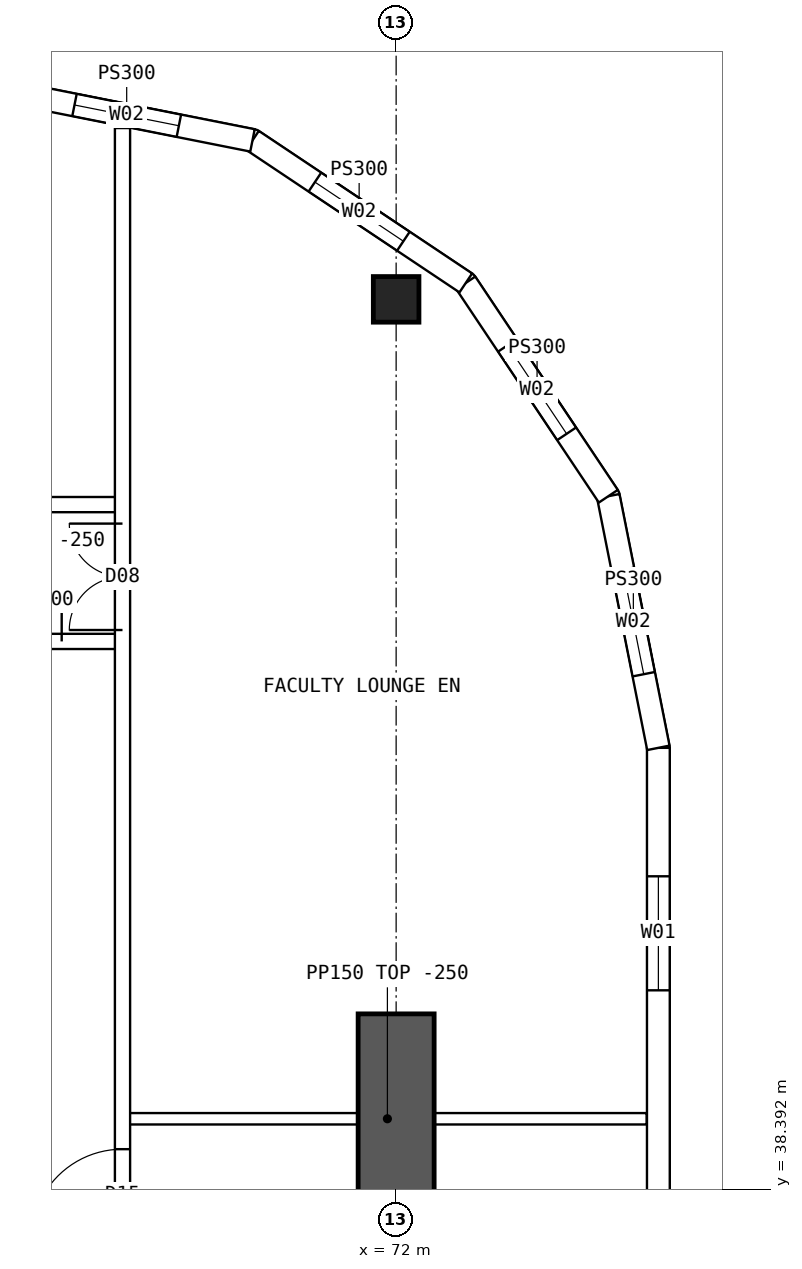
"""IFC4 building model, lengths in metres.
Left out: names, types, materials, properties, quantities, classifications, styles, units other than length and angle.
Written with IfcOpenShell. Run it as: python <this file> out.ifc"""

import sys

from ifc_helpers import new_model, si_unit, direction, frame, frame_2d, origin, origin_2d, place, context, subcontext, project, spatial, polyline, rectangle, hollow_rectangle, outline, extrude, element, fill, save


model = new_model("IFC4")
c1 = context("Model", 3, precision=1e-05, world=origin(), true_north=direction((0.0, 1.0)))
c2 = subcontext(c1, "Body", "Model", "MODEL_VIEW")
j1 = project(units=[si_unit("LENGTHUNIT", "METRE"), si_unit("PLANEANGLEUNIT", "RADIAN")], contexts=[c1])
p1 = place(None, origin())
s1 = spatial("IfcSite", under=j1, at=p1, CompositionType="ELEMENT")
p2 = place(p1, origin())
s2 = spatial("IfcBuilding", under=s1, at=p2, CompositionType="ELEMENT")
p3 = place(p2, frame((0.0, 0.0, 216.55)))
s3 = spatial("IfcBuildingStorey", under=s2, at=p3, CompositionType="ELEMENT", Elevation=216.55)
p4 = place(p3, frame((72.0, 50.1, 0.0), z_axis=(0.0, 0.0, 1.0), x_axis=(1.0, 0.0, 0.0)))
e1 = element("IfcColumn", 1, at=p4, inside=s3, PredefinedType="COLUMN", context=c2, shape_type="SweptSolid", body=[
    extrude(hollow_rectangle(XDim=0.6, YDim=0.6, WallThickness=0.06, at=origin_2d()), origin(), (0.0, 0.0, 1.0), 3.75),
])
p5 = place(p3, frame((72.0, 35.7, 0.0), z_axis=(0.0, 0.0, 1.0), x_axis=(0.0, 1.0, 0.0)))
e2 = element("IfcWall", 2, at=p5, inside=s3, PredefinedType="SHEAR", context=c2, shape_type="SweptSolid", body=[
    extrude(rectangle(XDim=5.0, YDim=1.0, at=frame_2d((2.5, 0.0))), origin(), (0.0, 0.0, 1.0), 3.75),
])
p6 = place(p3, frame((75.45, 19.8, 0.0), z_axis=(0.0, 0.0, 1.0), x_axis=(0.0, 1.0, 0.0)))
e3 = element("IfcWall", 3, at=p6, inside=s3, PredefinedType="SOLIDWALL", context=c2, shape_type="SweptSolid", body=[
    extrude(outline(polyline([(-0.015, -0.15), (24.415, -0.15), (24.385, 0.15), (0.015, 0.15), (-0.015, -0.15)])), origin(), (0.0, 0.0, 1.0), 3.5),
])
p7 = place(p6, frame((1.69, 0.0, 0.9)))
e4 = element("IfcOpeningElement", 4, at=p7, cuts=e3, PredefinedType="OPENING", context=c2, shape_type="SweptSolid", body=[
    extrude(rectangle(XDim=1.5, YDim=2.0, at=frame_2d((0.75, 1.0))), frame((0.0, 0.16, 0.0), z_axis=(0.0, -1.0, 0.0), x_axis=(1.0, 0.0, 0.0)), (0.0, 0.0, 1.0), 0.32),
])
p8 = place(p6, frame((6.57, 0.0, 0.9)))
e5 = element("IfcOpeningElement", 5, at=p8, cuts=e3, PredefinedType="OPENING", context=c2, shape_type="SweptSolid", body=[
    extrude(rectangle(XDim=1.5, YDim=2.0, at=frame_2d((0.75, 1.0))), frame((0.0, 0.16, 0.0), z_axis=(0.0, -1.0, 0.0), x_axis=(1.0, 0.0, 0.0)), (0.0, 0.0, 1.0), 0.32),
])
p9 = place(p6, frame((11.45, 0.0, 0.9)))
e6 = element("IfcOpeningElement", 6, at=p9, cuts=e3, PredefinedType="OPENING", context=c2, shape_type="SweptSolid", body=[
    extrude(rectangle(XDim=1.5, YDim=2.0, at=frame_2d((0.75, 1.0))), frame((0.0, 0.16, 0.0), z_axis=(0.0, -1.0, 0.0), x_axis=(1.0, 0.0, 0.0)), (0.0, 0.0, 1.0), 0.32),
])
p10 = place(p6, frame((16.33, 0.0, 0.9)))
e7 = element("IfcOpeningElement", 7, at=p10, cuts=e3, PredefinedType="OPENING", context=c2, shape_type="SweptSolid", body=[
    extrude(rectangle(XDim=1.5, YDim=2.0, at=frame_2d((0.75, 1.0))), frame((0.0, 0.16, 0.0), z_axis=(0.0, -1.0, 0.0), x_axis=(1.0, 0.0, 0.0)), (0.0, 0.0, 1.0), 0.32),
])
p11 = place(p6, frame((21.21, 0.0, 0.9)))
e8 = element("IfcOpeningElement", 8, at=p11, cuts=e3, PredefinedType="OPENING", context=c2, shape_type="SweptSolid", body=[
    extrude(rectangle(XDim=1.5, YDim=2.0, at=frame_2d((0.75, 1.0))), frame((0.0, 0.16, 0.0), z_axis=(0.0, -1.0, 0.0), x_axis=(1.0, 0.0, 0.0)), (0.0, 0.0, 1.0), 0.32),
])
p12 = place(p3, frame((75.45, 44.2, 0.0), z_axis=(0.0, 0.0, 1.0), x_axis=(-0.19508664885, 0.980786011034, 0.0)))
e9 = element("IfcWall", 9, at=p12, inside=s3, PredefinedType="SOLIDWALL", context=c2, shape_type="SweptSolid", body=[
    extrude(outline(polyline([(-0.015, -0.15), (3.405, -0.15), (3.345, 0.15), (0.015, 0.15), (-0.015, -0.15)])), origin(), (0.0, 0.0, 1.0), 3.5),
])
p13 = place(p12, frame((0.988, 0.0, 0.9)))
e10 = element("IfcOpeningElement", 10, at=p13, cuts=e9, PredefinedType="OPENING", context=c2, shape_type="SweptSolid", body=[
    extrude(rectangle(XDim=1.4, YDim=1.8, at=frame_2d((0.7, 0.9))), frame((0.0, 0.16, 0.0), z_axis=(0.0, -1.0, 0.0), x_axis=(1.0, 0.0, 0.0)), (0.0, 0.0, 1.0), 0.32),
])
p14 = place(p3, frame((74.792, 47.51, 0.0), z_axis=(0.0, 0.0, 1.0), x_axis=(-0.555567969291, 0.831471124873, 0.0)))
e11 = element("IfcWall", 11, at=p14, inside=s3, PredefinedType="SOLIDWALL", context=c2, shape_type="SweptSolid", body=[
    extrude(outline(polyline([(-0.03, -0.15), (3.405, -0.15), (3.345, 0.15), (0.03, 0.15), (-0.03, -0.15)])), origin(), (0.0, 0.0, 1.0), 3.5),
])
p15 = place(p14, frame((0.988, 0.0, 0.9)))
e12 = element("IfcOpeningElement", 12, at=p15, cuts=e11, PredefinedType="OPENING", context=c2, shape_type="SweptSolid", body=[
    extrude(rectangle(XDim=1.4, YDim=1.8, at=frame_2d((0.7, 0.9))), frame((0.0, 0.16, 0.0), z_axis=(0.0, -1.0, 0.0), x_axis=(1.0, 0.0, 0.0)), (0.0, 0.0, 1.0), 0.32),
])
p16 = place(p3, frame((72.917, 50.316, 0.0), z_axis=(0.0, 0.0, 1.0), x_axis=(-0.831460037396, 0.555584562613, 0.0)))
e13 = element("IfcWall", 13, at=p16, inside=s3, PredefinedType="SOLIDWALL", context=c2, shape_type="SweptSolid", body=[
    extrude(outline(polyline([(-0.03, -0.15), (3.405, -0.15), (3.345, 0.15), (0.03, 0.15), (-0.03, -0.15)])), origin(), (0.0, 0.0, 1.0), 3.5),
])
p17 = place(p16, frame((0.988, 0.0, 0.9)))
e14 = element("IfcOpeningElement", 14, at=p17, cuts=e13, PredefinedType="OPENING", context=c2, shape_type="SweptSolid", body=[
    extrude(rectangle(XDim=1.4, YDim=1.8, at=frame_2d((0.7, 0.9))), frame((0.0, 0.16, 0.0), z_axis=(0.0, -1.0, 0.0), x_axis=(1.0, 0.0, 0.0)), (0.0, 0.0, 1.0), 0.32),
])
p18 = place(p3, frame((70.11, 52.192, 0.0), z_axis=(0.0, 0.0, 1.0), x_axis=(-0.98078325777, 0.195100490205, 0.0)))
e15 = element("IfcWall", 15, at=p18, inside=s3, PredefinedType="SOLIDWALL", context=c2, shape_type="SweptSolid", body=[
    extrude(outline(polyline([(-0.03, -0.15), (3.405, -0.15), (3.345, 0.15), (0.03, 0.15), (-0.03, -0.15)])), origin(), (0.0, 0.0, 1.0), 3.5),
])
p19 = place(p18, frame((0.988, 0.0, 0.9)))
e16 = element("IfcOpeningElement", 16, at=p19, cuts=e15, PredefinedType="OPENING", context=c2, shape_type="SweptSolid", body=[
    extrude(rectangle(XDim=1.4, YDim=1.8, at=frame_2d((0.7, 0.9))), frame((0.0, 0.16, 0.0), z_axis=(0.0, -1.0, 0.0), x_axis=(1.0, 0.0, 0.0)), (0.0, 0.0, 1.0), 0.32),
])
p20 = place(p3, frame((66.35, 47.4, 0.0), z_axis=(0.0, 0.0, 1.0), x_axis=(1.0, 0.0, 0.0)))
e17 = element("IfcWall", 17, at=p20, inside=s3, PredefinedType="SOLIDWALL", context=c2, shape_type="SweptSolid", body=[
    extrude(rectangle(XDim=2.05, YDim=0.2, at=frame_2d((1.025, 0.0))), origin(), (0.0, 0.0, 1.0), 3.5),
])
p21 = place(p20, frame((0.2, 0.0, 0.0)))
e18 = element("IfcOpeningElement", 18, at=p21, cuts=e17, PredefinedType="OPENING", context=c2, shape_type="SweptSolid", body=[
    extrude(rectangle(XDim=0.9, YDim=2.1, at=frame_2d((0.45, 1.05))), frame((0.0, 0.11, 0.0), z_axis=(0.0, -1.0, 0.0), x_axis=(1.0, 0.0, 0.0)), (0.0, 0.0, 1.0), 0.22),
])
p22 = place(p3, frame((66.35, 45.6, 0.0), z_axis=(0.0, 0.0, 1.0), x_axis=(1.0, 0.0, 0.0)))
e19 = element("IfcWall", 19, at=p22, inside=s3, PredefinedType="SOLIDWALL", context=c2, shape_type="SweptSolid", body=[
    extrude(rectangle(XDim=2.05, YDim=0.2, at=frame_2d((1.025, 0.0))), origin(), (0.0, 0.0, 1.0), 3.5),
])
p23 = place(p22, frame((0.05, 0.0, 0.0)))
e20 = element("IfcOpeningElement", 20, at=p23, cuts=e19, PredefinedType="OPENING", context=c2, shape_type="SweptSolid", body=[
    extrude(rectangle(XDim=1.2, YDim=2.1, at=frame_2d((0.6, 1.05))), frame((0.0, 0.11, 0.0), z_axis=(0.0, -1.0, 0.0), x_axis=(1.0, 0.0, 0.0)), (0.0, 0.0, 1.0), 0.22),
])
p24 = place(p3, frame((68.4, 11.646, 0.0), z_axis=(0.0, 0.0, 1.0), x_axis=(0.0, 1.0, 0.0)))
e21 = element("IfcWall", 21, at=p24, inside=s3, PredefinedType="SOLIDWALL", context=c2, shape_type="SweptSolid", body=[
    extrude(rectangle(XDim=40.708, YDim=0.2, at=frame_2d((20.354, 0.0))), origin(), (0.0, 0.0, 1.0), 3.5),
])
p25 = place(p24, frame((13.434, 0.0, 0.0)))
e22 = element("IfcOpeningElement", 22, at=p25, cuts=e21, PredefinedType="OPENING", context=c2, shape_type="SweptSolid", body=[
    extrude(rectangle(XDim=1.2, YDim=2.1, at=frame_2d((0.6, 1.05))), frame((0.0, 0.11, 0.0), z_axis=(0.0, -1.0, 0.0), x_axis=(1.0, 0.0, 0.0)), (0.0, 0.0, 1.0), 0.22),
])
p26 = place(p24, frame((26.074, 0.0, 0.0)))
e23 = element("IfcOpeningElement", 23, at=p26, cuts=e21, PredefinedType="OPENING", context=c2, shape_type="SweptSolid", body=[
    extrude(rectangle(XDim=1.2, YDim=2.1, at=frame_2d((0.6, 1.05))), frame((0.0, 0.11, 0.0), z_axis=(0.0, -1.0, 0.0), x_axis=(1.0, 0.0, 0.0)), (0.0, 0.0, 1.0), 0.22),
])
p27 = place(p24, frame((5.104, 0.0, 0.0)))
e24 = element("IfcOpeningElement", 24, at=p27, cuts=e21, PredefinedType="OPENING", context=c2, shape_type="SweptSolid", body=[
    extrude(rectangle(XDim=1.4, YDim=2.1, at=frame_2d((0.7, 1.05))), frame((0.0, 0.11, 0.0), z_axis=(0.0, -1.0, 0.0), x_axis=(1.0, 0.0, 0.0)), (0.0, 0.0, 1.0), 0.22),
])
p28 = place(p24, frame((34.104, 0.0, 0.0)))
e25 = element("IfcOpeningElement", 25, at=p28, cuts=e21, PredefinedType="OPENING", context=c2, shape_type="SweptSolid", body=[
    extrude(rectangle(XDim=1.4, YDim=2.1, at=frame_2d((0.7, 1.05))), frame((0.0, 0.11, 0.0), z_axis=(0.0, -1.0, 0.0), x_axis=(1.0, 0.0, 0.0)), (0.0, 0.0, 1.0), 0.22),
])
p29 = place(p3, frame((68.475, 39.32, 0.0), z_axis=(0.0, 0.0, 1.0), x_axis=(1.0, 0.0, 0.0)))
e26 = element("IfcWall", 26, at=p29, inside=s3, PredefinedType="PARTITIONING", context=c2, shape_type="SweptSolid", body=[
    extrude(rectangle(XDim=6.82, YDim=0.15, at=frame_2d((3.41, 0.0))), origin(), (0.0, 0.0, 1.0), 3.5),
])
p30 = place(p11, origin())
e27 = element("IfcWindow", 27, at=p30, inside=s3, PartitioningType="SINGLE_PANEL", PredefinedType="WINDOW", context=c2, shape_type="SweptSolid", body=[
    extrude(rectangle(XDim=1.5, YDim=2.0, at=frame_2d((0.75, 1.0))), frame((0.0, 0.03, 0.0), z_axis=(0.0, -1.0, 0.0), x_axis=(1.0, 0.0, 0.0)), (0.0, 0.0, 1.0), 0.06),
])
fill(e8, e27)
p31 = place(p13, origin())
e28 = element("IfcWindow", 28, at=p31, inside=s3, PartitioningType="SINGLE_PANEL", PredefinedType="WINDOW", context=c2, shape_type="SweptSolid", body=[
    extrude(rectangle(XDim=1.4, YDim=1.8, at=frame_2d((0.7, 0.9))), frame((0.0, 0.03, 0.0), z_axis=(0.0, -1.0, 0.0), x_axis=(1.0, 0.0, 0.0)), (0.0, 0.0, 1.0), 0.06),
])
fill(e10, e28)
p32 = place(p15, origin())
e29 = element("IfcWindow", 29, at=p32, inside=s3, PartitioningType="SINGLE_PANEL", PredefinedType="WINDOW", context=c2, shape_type="SweptSolid", body=[
    extrude(rectangle(XDim=1.4, YDim=1.8, at=frame_2d((0.7, 0.9))), frame((0.0, 0.03, 0.0), z_axis=(0.0, -1.0, 0.0), x_axis=(1.0, 0.0, 0.0)), (0.0, 0.0, 1.0), 0.06),
])
fill(e12, e29)
p33 = place(p17, origin())
e30 = element("IfcWindow", 30, at=p33, inside=s3, PartitioningType="SINGLE_PANEL", PredefinedType="WINDOW", context=c2, shape_type="SweptSolid", body=[
    extrude(rectangle(XDim=1.4, YDim=1.8, at=frame_2d((0.7, 0.9))), frame((0.0, 0.03, 0.0), z_axis=(0.0, -1.0, 0.0), x_axis=(1.0, 0.0, 0.0)), (0.0, 0.0, 1.0), 0.06),
])
fill(e14, e30)
p34 = place(p19, origin())
e31 = element("IfcWindow", 31, at=p34, inside=s3, PartitioningType="SINGLE_PANEL", PredefinedType="WINDOW", context=c2, shape_type="SweptSolid", body=[
    extrude(rectangle(XDim=1.4, YDim=1.8, at=frame_2d((0.7, 0.9))), frame((0.0, 0.03, 0.0), z_axis=(0.0, -1.0, 0.0), x_axis=(1.0, 0.0, 0.0)), (0.0, 0.0, 1.0), 0.06),
])
fill(e16, e31)
p35 = place(p23, origin())
e32 = element("IfcDoor", 32, at=p35, inside=s3, OperationType="DOUBLE_DOOR_SINGLE_SWING", PredefinedType="DOOR", context=c2, shape_type="SweptSolid", body=[
    extrude(rectangle(XDim=1.2, YDim=2.1, at=frame_2d((0.6, 1.05))), frame((0.0, 0.025, 0.0), z_axis=(0.0, -1.0, 0.0), x_axis=(1.0, 0.0, 0.0)), (0.0, 0.0, 1.0), 0.05),
])
fill(e20, e32)
p36 = place(p26, origin())
e33 = element("IfcDoor", 33, at=p36, inside=s3, OperationType="SINGLE_SWING_LEFT", PredefinedType="DOOR", context=c2, shape_type="SweptSolid", body=[
    extrude(rectangle(XDim=1.2, YDim=2.1, at=frame_2d((0.6, 1.05))), frame((0.0, 0.025, 0.0), z_axis=(0.0, -1.0, 0.0), x_axis=(1.0, 0.0, 0.0)), (0.0, 0.0, 1.0), 0.05),
])
fill(e23, e33)
p37 = place(p28, origin())
e34 = element("IfcDoor", 34, at=p37, inside=s3, OperationType="DOUBLE_DOOR_SINGLE_SWING", PredefinedType="DOOR", context=c2, shape_type="SweptSolid", body=[
    extrude(rectangle(XDim=1.4, YDim=2.1, at=frame_2d((0.7, 1.05))), frame((0.0, 0.025, 0.0), z_axis=(0.0, -1.0, 0.0), x_axis=(1.0, 0.0, 0.0)), (0.0, 0.0, 1.0), 0.05),
])
fill(e25, e34)
save(model, sys.argv[1])
